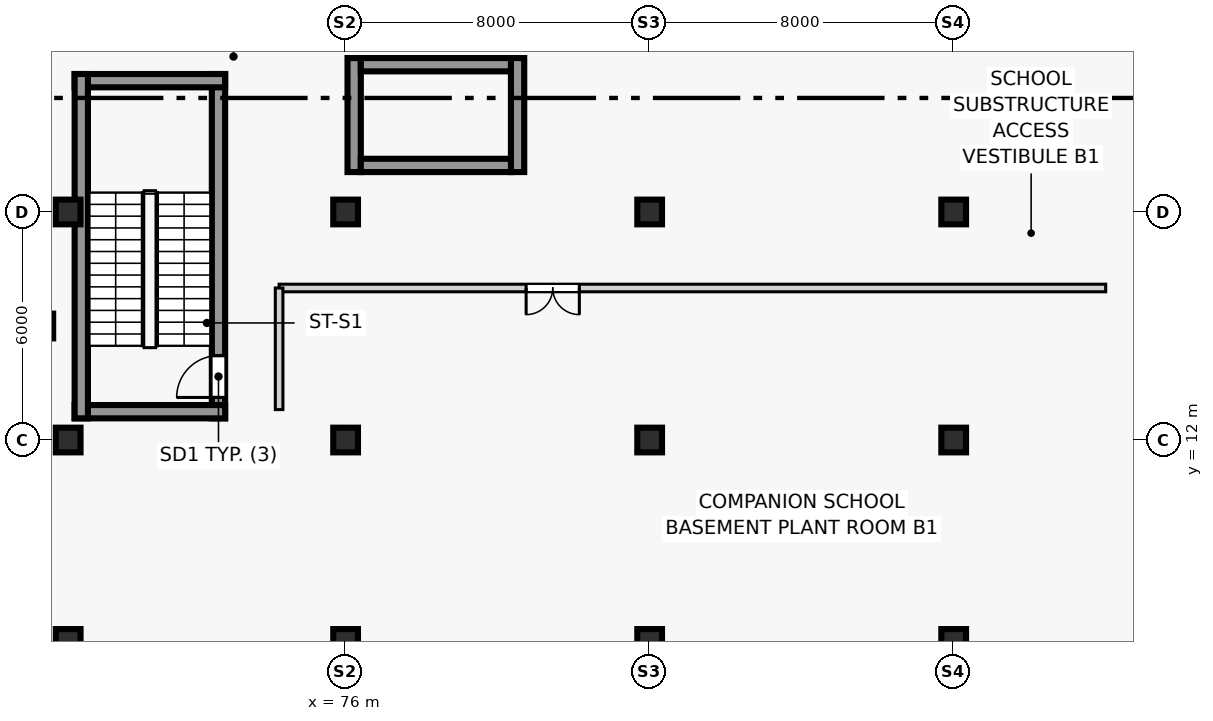
"""IFC4 building model, lengths in metres.
Left out: names, types, materials, properties, quantities, classifications, styles, units other than length and angle.
Written with IfcOpenShell. Run it as: python <this file> out.ifc"""

import sys

from ifc_helpers import new_model, si_unit, direction, frame, frame_2d, origin, origin_2d, place, context, subcontext, project, spatial, rectangle, extrude, source, transform, mapped, element, fill, save


model = new_model("IFC4")
c1 = context("Model", 3, precision=1e-05, world=origin(), true_north=direction((0.0, 1.0)))
c2 = subcontext(c1, "Body", "Model", "MODEL_VIEW")
j1 = project(units=[si_unit("LENGTHUNIT", "METRE"), si_unit("PLANEANGLEUNIT", "RADIAN")], contexts=[c1])
p1 = place(None, origin())
s1 = spatial("IfcSite", under=j1, at=p1, CompositionType="ELEMENT")
p2 = place(p1, origin())
s2 = spatial("IfcBuilding", under=s1, at=p2, CompositionType="ELEMENT")
p3 = place(p2, frame((0.0, 0.0, -4.5)))
s3 = spatial("IfcBuildingStorey", under=s2, at=p3, CompositionType="ELEMENT", Elevation=-4.5)
m1 = source(origin(), c2, "Body", "SweptSolid", [
    extrude(rectangle(XDim=0.65, YDim=0.65, at=origin_2d()), origin(), (0.0, 0.0, 1.0), 1.8),
])
p4 = place(p3, frame((67.98, 15.0, 2.7), z_axis=(0.0, 0.0, 1.0), x_axis=(1.0, 0.0, 0.0)))
e1 = element("IfcColumn", 1, at=p4, inside=s3, PredefinedType="COLUMN", context=c2, shape_type="MappedRepresentation", body=[
    mapped(m1, transform((0.0, 0.0, 0.0), scale=1.0)),
])
p5 = place(p3, frame((72.655, 12.57, 0.0), z_axis=(0.0, 0.0, 1.0), x_axis=(0.0, 1.0, 0.0)))
e2 = element("IfcWall", 2, at=p5, inside=s3, PredefinedType="SHEAR", context=c2, shape_type="SweptSolid", body=[
    extrude(rectangle(XDim=9.06, YDim=0.35, at=frame_2d((4.53, 0.0))), origin(), (0.0, 0.0, 1.0), 4.5),
])
p6 = place(p5, frame((0.55, 0.0, 0.0)))
e3 = element("IfcOpeningElement", 3, at=p6, cuts=e2, PredefinedType="OPENING", context=c2, shape_type="SweptSolid", body=[
    extrude(rectangle(XDim=1.1, YDim=2.2, at=frame_2d((0.55, 1.1))), frame((0.0, 0.185, 0.0), z_axis=(0.0, -1.0, 0.0), x_axis=(1.0, 0.0, 0.0)), (0.0, 0.0, 1.0), 0.37),
])
for number, where, z_axis, x_axis in (
    (4, (68.87, 12.745, 0.0), (0.0, 0.0, 1.0), (1.0, 0.0, 0.0)),
    (5, (68.87, 21.455, 0.0), (0.0, 0.0, 1.0), (1.0, 0.0, 0.0)),
):
    element("IfcWall", number, at=place(p3, frame(where, z_axis=z_axis, x_axis=x_axis)), inside=s3, PredefinedType="SHEAR", context=c2, shape_type="SweptSolid", body=[
        extrude(rectangle(XDim=3.96, YDim=0.35, at=frame_2d((1.98, 0.0))), origin(), (0.0, 0.0, 1.0), 4.5),
    ])
p7 = place(p3, frame((69.045, 12.57, 0.0), z_axis=(0.0, 0.0, 1.0), x_axis=(0.0, 1.0, 0.0)))
e6 = element("IfcWall", 6, at=p7, inside=s3, PredefinedType="SHEAR", context=c2, shape_type="SweptSolid", body=[
    extrude(rectangle(XDim=9.06, YDim=0.35, at=frame_2d((4.53, 0.0))), origin(), (0.0, 0.0, 1.0), 4.5),
])
for number, where, z_axis, x_axis in (
    (7, (76.225, 19.05, 0.0), (0.0, 0.0, 1.0), (0.0, 1.0, 0.0)),
    (8, (80.525, 19.05, 0.0), (0.0, 0.0, 1.0), (0.0, 1.0, 0.0)),
):
    element("IfcWall", number, at=place(p3, frame(where, z_axis=z_axis, x_axis=x_axis)), inside=s3, PredefinedType="SHEAR", context=c2, shape_type="SweptSolid", body=[
        extrude(rectangle(XDim=3.0, YDim=0.35, at=frame_2d((1.5, 0.0))), origin(), (0.0, 0.0, 1.0), 4.5),
    ])
for number, where, z_axis, x_axis in (
    (9, (76.4, 21.875, 0.0), (0.0, 0.0, 1.0), (1.0, 0.0, 0.0)),
    (10, (76.4, 19.225, 0.0), (0.0, 0.0, 1.0), (1.0, 0.0, 0.0)),
):
    element("IfcWall", number, at=place(p3, frame(where, z_axis=z_axis, x_axis=x_axis)), inside=s3, PredefinedType="SHEAR", context=c2, shape_type="SweptSolid", body=[
        extrude(rectangle(XDim=3.95, YDim=0.35, at=frame_2d((1.975, 0.0))), origin(), (0.0, 0.0, 1.0), 4.5),
    ])
m2 = source(origin(), c2, "Body", "SweptSolid", [
    extrude(rectangle(XDim=0.65, YDim=0.65, at=origin_2d()), origin(), (0.0, 0.0, 1.0), 4.5),
])
for number, where, z_axis, x_axis in (
    (11, (68.7, 6.7, 0.0), (0.0, 0.0, 1.0), (1.0, 0.0, 0.0)),
    (12, (68.7, 12.0, 0.0), (0.0, 0.0, 1.0), (1.0, 0.0, 0.0)),
    (13, (68.7, 18.0, 0.0), (0.0, 0.0, 1.0), (1.0, 0.0, 0.0)),
    (14, (76.0, 6.7, 0.0), (0.0, 0.0, 1.0), (1.0, 0.0, 0.0)),
    (15, (76.0, 12.0, 0.0), (0.0, 0.0, 1.0), (1.0, 0.0, 0.0)),
    (16, (76.0, 18.0, 0.0), (0.0, 0.0, 1.0), (1.0, 0.0, 0.0)),
    (17, (84.0, 6.7, 0.0), (0.0, 0.0, 1.0), (1.0, 0.0, 0.0)),
    (18, (84.0, 12.0, 0.0), (0.0, 0.0, 1.0), (1.0, 0.0, 0.0)),
    (19, (84.0, 18.0, 0.0), (0.0, 0.0, 1.0), (1.0, 0.0, 0.0)),
    (20, (92.0, 6.7, 0.0), (0.0, 0.0, 1.0), (1.0, 0.0, 0.0)),
    (21, (92.0, 12.0, 0.0), (0.0, 0.0, 1.0), (1.0, 0.0, 0.0)),
    (22, (92.0, 18.0, 0.0), (0.0, 0.0, 1.0), (1.0, 0.0, 0.0)),
):
    element("IfcColumn", number, at=place(p3, frame(where, z_axis=z_axis, x_axis=x_axis)), inside=s3, PredefinedType="COLUMN", context=c2, shape_type="MappedRepresentation", body=[
        mapped(m2, transform((0.0, 0.0, 0.0), scale=1.0)),
    ])
p8 = place(p3, frame((74.25, 16.0, 0.0), z_axis=(0.0, 0.0, 1.0), x_axis=(1.0, 0.0, 0.0)))
e23 = element("IfcWall", 23, at=p8, inside=s3, PredefinedType="PARTITIONING", context=c2, shape_type="SweptSolid", body=[
    extrude(rectangle(XDim=21.75, YDim=0.2, at=frame_2d((10.875, 0.0))), origin(), (0.0, 0.0, 1.0), 4.2),
])
p9 = place(p8, frame((6.5, 0.0, 0.0)))
e24 = element("IfcOpeningElement", 24, at=p9, cuts=e23, PredefinedType="OPENING", context=c2, shape_type="SweptSolid", body=[
    extrude(rectangle(XDim=1.4, YDim=2.2, at=frame_2d((0.7, 1.1))), frame((0.0, 0.11, 0.0), z_axis=(0.0, -1.0, 0.0), x_axis=(1.0, 0.0, 0.0)), (0.0, 0.0, 1.0), 0.22),
])
p10 = place(p3, frame((74.25, 12.8, 0.0), z_axis=(0.0, 0.0, 1.0), x_axis=(0.0, 1.0, 0.0)))
e25 = element("IfcWall", 25, at=p10, inside=s3, PredefinedType="PARTITIONING", context=c2, shape_type="SweptSolid", body=[
    extrude(rectangle(XDim=3.2, YDim=0.2, at=frame_2d((1.6, 0.0))), origin(), (0.0, 0.0, 1.0), 4.2),
])
m3 = source(origin(), c2, "Body", "SweptSolid", [
    extrude(rectangle(XDim=1.4, YDim=2.2, at=frame_2d((0.7, 1.1))), frame((0.0, 0.025, 0.0), z_axis=(0.0, -1.0, 0.0), x_axis=(1.0, 0.0, 0.0)), (0.0, 0.0, 1.0), 0.05),
])
p11 = place(p9, frame((1.4, 0.0, 0.0), z_axis=(0.0, 0.0, 1.0), x_axis=(-1.0, 0.0, 0.0)))
e26 = element("IfcDoor", 26, at=p11, inside=s3, OperationType="DOUBLE_DOOR_SINGLE_SWING", PredefinedType="DOOR", context=c2, shape_type="MappedRepresentation", body=[
    mapped(m3, transform((0.0, 0.0, 0.0), scale=1.0)),
])
fill(e24, e26)
m4 = source(origin(), c2, "Body", "SweptSolid", [
    extrude(rectangle(XDim=1.1, YDim=2.2, at=frame_2d((0.55, 1.1))), frame((0.0, 0.025, 0.0), z_axis=(0.0, -1.0, 0.0), x_axis=(1.0, 0.0, 0.0)), (0.0, 0.0, 1.0), 0.05),
])
p12 = place(p6, origin())
e27 = element("IfcDoor", 27, at=p12, inside=s3, OperationType="SINGLE_SWING_LEFT", PredefinedType="DOOR", context=c2, shape_type="MappedRepresentation", body=[
    mapped(m4, transform((0.0, 0.0, 0.0), scale=1.0)),
])
fill(e3, e27)
save(model, sys.argv[1])
